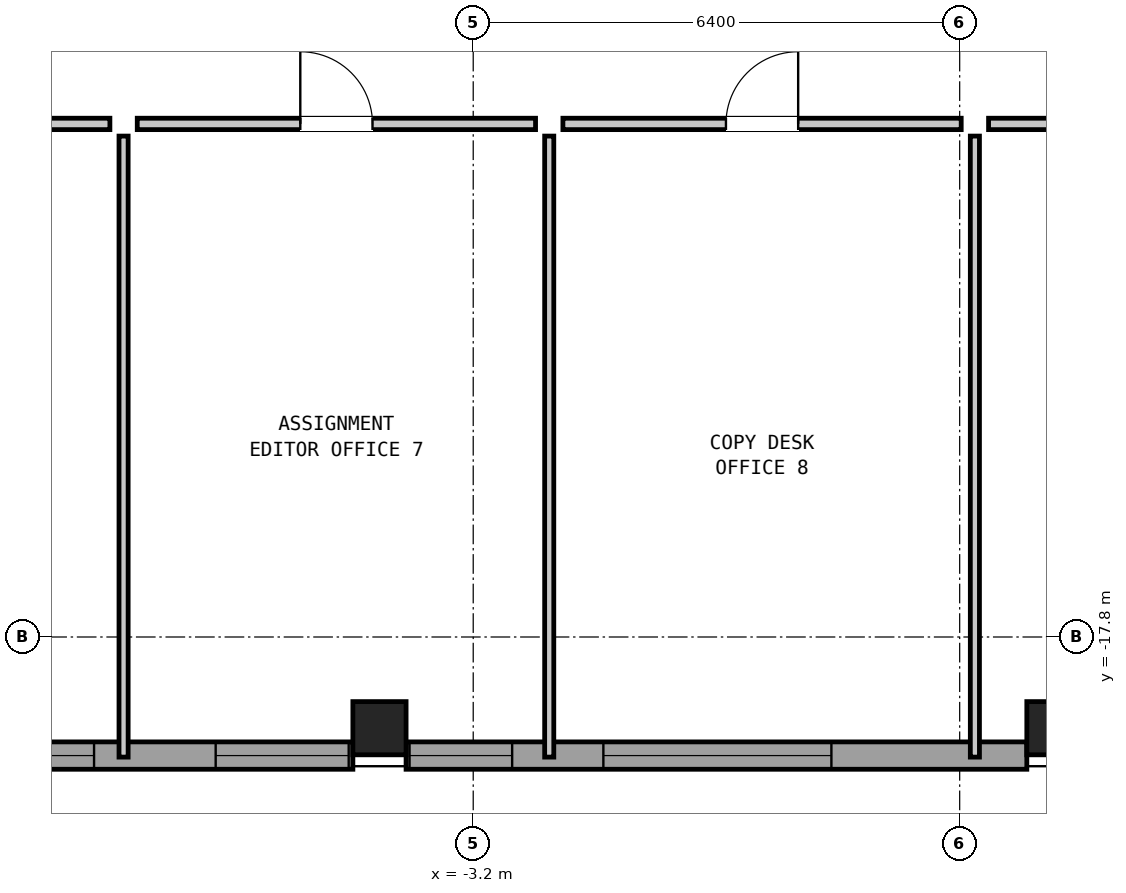
"""IFC4 building model, lengths in metres.
Left out: names, types, materials, properties, quantities, classifications, styles, units other than length and angle.
Written with IfcOpenShell. Run it as: python <this file> out.ifc"""

import sys

from ifc_helpers import new_model, si_unit, direction, frame, frame_2d, origin, origin_2d, place, context, subcontext, project, spatial, rectangle, hollow_rectangle, extrude, element, fill, save


model = new_model("IFC4")
c1 = context("Model", 3, precision=1e-05, world=origin(), true_north=direction((0.0, 1.0)))
c2 = subcontext(c1, "Body", "Model", "MODEL_VIEW")
j1 = project(units=[si_unit("LENGTHUNIT", "METRE"), si_unit("PLANEANGLEUNIT", "RADIAN")], contexts=[c1])
p1 = place(None, origin())
s1 = spatial("IfcSite", under=j1, at=p1, CompositionType="ELEMENT")
p2 = place(p1, origin())
s2 = spatial("IfcBuilding", under=s1, at=p2, CompositionType="ELEMENT")
p3 = place(p2, frame((0.0, 0.0, 208.65)))
s3 = spatial("IfcBuildingStorey", under=s2, at=p3, CompositionType="ELEMENT", Elevation=208.65)
for number, where, z_axis, x_axis in (
    (1, (-4.433, -19.0, 0.0), (0.0, 0.0, 1.0), (1.0, 0.0, 0.0)),
    (2, (4.433, -19.0, 0.0), (0.0, 0.0, 1.0), (1.0, 0.0, 0.0)),
):
    element("IfcColumn", number, at=place(p3, frame(where, z_axis=z_axis, x_axis=x_axis)), inside=s3, PredefinedType="COLUMN", context=c2, shape_type="SweptSolid", body=[
        extrude(hollow_rectangle(XDim=0.7, YDim=0.7, WallThickness=0.045, at=origin_2d()), origin(), (0.0, 0.0, 1.0), 3.05),
    ])
p4 = place(p3, frame((4.083, -19.36, 0.0), z_axis=(0.0, 0.0, 1.0), x_axis=(-1.0, 0.0, 0.0)))
e3 = element("IfcWall", 3, at=p4, inside=s3, PredefinedType="SOLIDWALL", context=c2, shape_type="SweptSolid", body=[
    extrude(rectangle(XDim=8.167, YDim=0.36, at=frame_2d((4.083, 0.0))), origin(), (0.0, 0.0, 1.0), 2.374),
])
p5 = place(p4, frame((2.571, 0.0, 0.2)))
e4 = element("IfcOpeningElement", 4, at=p5, cuts=e3, PredefinedType="OPENING", context=c2, shape_type="SweptSolid", body=[
    extrude(rectangle(XDim=3.0, YDim=1.0, at=frame_2d((1.5, 0.5))), frame((0.0, 0.192, 0.0), z_axis=(0.0, -1.0, 0.0), x_axis=(1.0, 0.0, 0.0)), (0.0, 0.0, 1.0), 0.384),
])
p6 = place(p4, frame((6.771, 0.0, 1.2)))
e5 = element("IfcOpeningElement", 5, at=p6, cuts=e3, PredefinedType="OPENING", context=c2, shape_type="SweptSolid", body=[
    extrude(rectangle(XDim=1.35, YDim=1.0, at=frame_2d((0.675, 0.5))), frame((0.0, 0.192, 0.0), z_axis=(0.0, -1.0, 0.0), x_axis=(1.0, 0.0, 0.0)), (0.0, 0.0, 1.0), 0.384),
])
p7 = place(p3, frame((-4.783, -19.36, 0.0), z_axis=(0.0, 0.0, 1.0), x_axis=(-1.0, 0.0, 0.0)))
e6 = element("IfcWall", 6, at=p7, inside=s3, PredefinedType="SOLIDWALL", context=c2, shape_type="SweptSolid", body=[
    extrude(rectangle(XDim=8.179, YDim=0.36, at=frame_2d((4.089, 0.0))), origin(), (0.0, 0.0, 1.0), 2.374),
])
p8 = place(p7, frame((0.055, 0.0, 1.2)))
e7 = element("IfcOpeningElement", 7, at=p8, cuts=e6, PredefinedType="OPENING", context=c2, shape_type="SweptSolid", body=[
    extrude(rectangle(XDim=1.75, YDim=1.0, at=frame_2d((0.875, 0.5))), frame((0.0, 0.192, 0.0), z_axis=(0.0, -1.0, 0.0), x_axis=(1.0, 0.0, 0.0)), (0.0, 0.0, 1.0), 0.384),
])
p9 = place(p7, frame((3.405, 0.0, 0.2)))
e8 = element("IfcOpeningElement", 8, at=p9, cuts=e6, PredefinedType="OPENING", context=c2, shape_type="SweptSolid", body=[
    extrude(rectangle(XDim=2.35, YDim=1.15, at=frame_2d((1.175, 0.575))), frame((0.0, 0.192, 0.0), z_axis=(0.0, -1.0, 0.0), x_axis=(1.0, 0.0, 0.0)), (0.0, 0.0, 1.0), 0.384),
])
for number, where, z_axis, x_axis in (
    (9, (-7.8, -19.38, 0.0), (0.0, 0.0, 1.0), (0.0, 1.0, 0.0)),
    (10, (-2.2, -19.38, 0.0), (0.0, 0.0, 1.0), (0.0, 1.0, 0.0)),
):
    element("IfcWall", number, at=place(p3, frame(where, z_axis=z_axis, x_axis=x_axis)), inside=s3, PredefinedType="PARTITIONING", context=c2, shape_type="SweptSolid", body=[
        extrude(rectangle(XDim=8.17, YDim=0.12, at=frame_2d((4.085, 0.0))), origin(), (0.0, 0.0, 1.0), 2.86),
    ])
p10 = place(p3, frame((3.4, -19.38, 0.0), z_axis=(0.0, 0.0, 1.0), x_axis=(0.0, 1.0, 0.0)))
e11 = element("IfcWall", 11, at=p10, inside=s3, PredefinedType="PARTITIONING", context=c2, shape_type="SweptSolid", body=[
    extrude(rectangle(XDim=8.17, YDim=0.12, at=frame_2d((4.085, 0.0))), origin(), (0.0, 0.0, 1.0), 2.381),
])
p11 = place(p3, frame((-11.12, -11.05, 0.0), z_axis=(0.0, 0.0, 1.0), x_axis=(1.0, 0.0, 0.0)))
e12 = element("IfcWall", 12, at=p11, inside=s3, PredefinedType="PARTITIONING", context=c2, shape_type="SweptSolid", body=[
    extrude(rectangle(XDim=3.14, YDim=0.15, at=frame_2d((1.57, 0.0))), origin(), (0.0, 0.0, 1.0), 2.86),
])
p12 = place(p11, frame((0.295, 0.0, 0.0)))
e13 = element("IfcOpeningElement", 13, at=p12, cuts=e12, PredefinedType="OPENING", context=c2, shape_type="SweptSolid", body=[
    extrude(rectangle(XDim=0.95, YDim=2.1, at=frame_2d((0.475, 1.05))), frame((0.0, 0.087, 0.0), z_axis=(0.0, -1.0, 0.0), x_axis=(1.0, 0.0, 0.0)), (0.0, 0.0, 1.0), 0.174),
])
p13 = place(p3, frame((-7.62, -11.05, 0.0), z_axis=(0.0, 0.0, 1.0), x_axis=(1.0, 0.0, 0.0)))
e14 = element("IfcWall", 14, at=p13, inside=s3, PredefinedType="PARTITIONING", context=c2, shape_type="SweptSolid", body=[
    extrude(rectangle(XDim=5.24, YDim=0.15, at=frame_2d((2.62, 0.0))), origin(), (0.0, 0.0, 1.0), 2.86),
])
p14 = place(p13, frame((2.145, 0.0, 0.0)))
e15 = element("IfcOpeningElement", 15, at=p14, cuts=e14, PredefinedType="OPENING", context=c2, shape_type="SweptSolid", body=[
    extrude(rectangle(XDim=0.95, YDim=2.1, at=frame_2d((0.475, 1.05))), frame((0.0, 0.087, 0.0), z_axis=(0.0, -1.0, 0.0), x_axis=(1.0, 0.0, 0.0)), (0.0, 0.0, 1.0), 0.174),
])
p15 = place(p3, frame((-2.02, -11.05, 0.0), z_axis=(0.0, 0.0, 1.0), x_axis=(1.0, 0.0, 0.0)))
e16 = element("IfcWall", 16, at=p15, inside=s3, PredefinedType="PARTITIONING", context=c2, shape_type="SweptSolid", body=[
    extrude(rectangle(XDim=5.24, YDim=0.15, at=frame_2d((2.62, 0.0))), origin(), (0.0, 0.0, 1.0), 2.86),
])
p16 = place(p15, frame((2.145, 0.0, 0.0)))
e17 = element("IfcOpeningElement", 17, at=p16, cuts=e16, PredefinedType="OPENING", context=c2, shape_type="SweptSolid", body=[
    extrude(rectangle(XDim=0.95, YDim=2.1, at=frame_2d((0.475, 1.05))), frame((0.0, 0.087, 0.0), z_axis=(0.0, -1.0, 0.0), x_axis=(1.0, 0.0, 0.0)), (0.0, 0.0, 1.0), 0.174),
])
p17 = place(p3, frame((3.58, -11.05, 0.0), z_axis=(0.0, 0.0, 1.0), x_axis=(1.0, 0.0, 0.0)))
e18 = element("IfcWall", 18, at=p17, inside=s3, PredefinedType="PARTITIONING", context=c2, shape_type="SweptSolid", body=[
    extrude(rectangle(XDim=4.64, YDim=0.15, at=frame_2d((2.32, 0.0))), origin(), (0.0, 0.0, 1.0), 2.86),
])
p18 = place(p17, frame((1.845, 0.0, 0.0)))
e19 = element("IfcOpeningElement", 19, at=p18, cuts=e18, PredefinedType="OPENING", context=c2, shape_type="SweptSolid", body=[
    extrude(rectangle(XDim=0.95, YDim=2.1, at=frame_2d((0.475, 1.05))), frame((0.0, 0.087, 0.0), z_axis=(0.0, -1.0, 0.0), x_axis=(1.0, 0.0, 0.0)), (0.0, 0.0, 1.0), 0.174),
])
p19 = place(p5, origin())
e20 = element("IfcWindow", 20, at=p19, inside=s3, PartitioningType="SINGLE_PANEL", PredefinedType="WINDOW", context=c2, shape_type="SweptSolid", body=[
    extrude(rectangle(XDim=3.0, YDim=1.0, at=frame_2d((1.5, 0.5))), frame((0.0, 0.03, 0.0), z_axis=(0.0, -1.0, 0.0), x_axis=(1.0, 0.0, 0.0)), (0.0, 0.0, 1.0), 0.06),
])
fill(e4, e20)
p20 = place(p6, origin())
e21 = element("IfcWindow", 21, at=p20, inside=s3, PartitioningType="SINGLE_PANEL", PredefinedType="WINDOW", context=c2, shape_type="SweptSolid", body=[
    extrude(rectangle(XDim=1.35, YDim=1.0, at=frame_2d((0.675, 0.5))), frame((0.0, 0.03, 0.0), z_axis=(0.0, -1.0, 0.0), x_axis=(1.0, 0.0, 0.0)), (0.0, 0.0, 1.0), 0.06),
])
fill(e5, e21)
p21 = place(p8, origin())
e22 = element("IfcWindow", 22, at=p21, inside=s3, PartitioningType="SINGLE_PANEL", PredefinedType="WINDOW", context=c2, shape_type="SweptSolid", body=[
    extrude(rectangle(XDim=1.75, YDim=1.0, at=frame_2d((0.875, 0.5))), frame((0.0, 0.03, 0.0), z_axis=(0.0, -1.0, 0.0), x_axis=(1.0, 0.0, 0.0)), (0.0, 0.0, 1.0), 0.06),
])
fill(e7, e22)
p22 = place(p9, origin())
e23 = element("IfcWindow", 23, at=p22, inside=s3, PartitioningType="SINGLE_PANEL", PredefinedType="WINDOW", context=c2, shape_type="SweptSolid", body=[
    extrude(rectangle(XDim=2.35, YDim=1.15, at=frame_2d((1.175, 0.575))), frame((0.0, 0.03, 0.0), z_axis=(0.0, -1.0, 0.0), x_axis=(1.0, 0.0, 0.0)), (0.0, 0.0, 1.0), 0.06),
])
fill(e8, e23)
p23 = place(p14, origin())
e24 = element("IfcDoor", 24, at=p23, inside=s3, OperationType="SINGLE_SWING_LEFT", PredefinedType="DOOR", context=c2, shape_type="SweptSolid", body=[
    extrude(rectangle(XDim=0.95, YDim=2.1, at=frame_2d((0.475, 1.05))), frame((0.0, 0.025, 0.0), z_axis=(0.0, -1.0, 0.0), x_axis=(1.0, 0.0, 0.0)), (0.0, 0.0, 1.0), 0.05),
])
fill(e15, e24)
p24 = place(p16, origin())
e25 = element("IfcDoor", 25, at=p24, inside=s3, OperationType="SINGLE_SWING_RIGHT", PredefinedType="DOOR", context=c2, shape_type="SweptSolid", body=[
    extrude(rectangle(XDim=0.95, YDim=2.1, at=frame_2d((0.475, 1.05))), frame((0.0, 0.025, 0.0), z_axis=(0.0, -1.0, 0.0), x_axis=(1.0, 0.0, 0.0)), (0.0, 0.0, 1.0), 0.05),
])
fill(e17, e25)
save(model, sys.argv[1])
